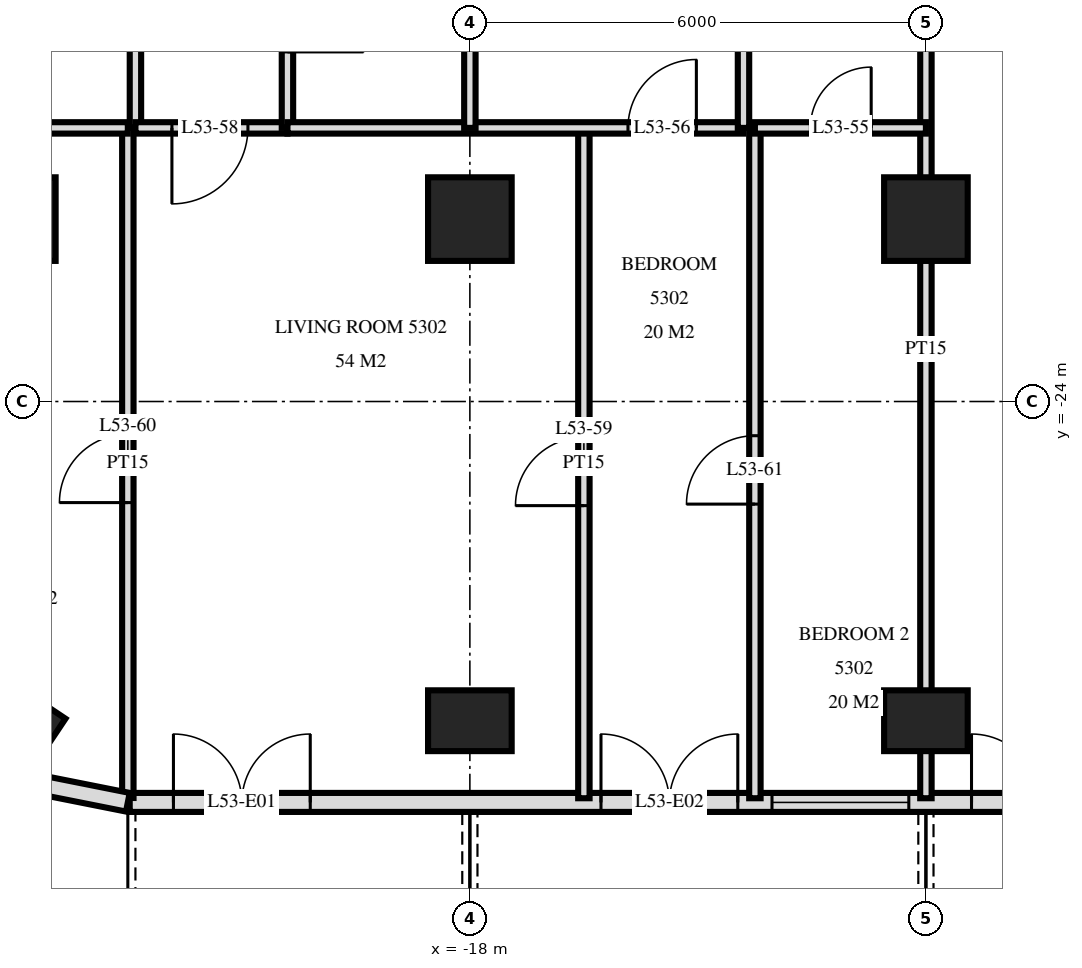
"""IFC4 building model, lengths in metres.
Left out: names, types, materials, properties, quantities, classifications, styles, units other than length and angle.
Written with IfcOpenShell. Run it as: python <this file> out.ifc"""

import sys

from ifc_helpers import new_model, si_unit, direction, frame, frame_2d, origin, origin_2d, place, context, subcontext, project, spatial, rectangle, extrude, element, fill, save


model = new_model("IFC4")
c1 = context("Model", 3, precision=1e-05, world=origin(), true_north=direction((0.0, 1.0)))
c2 = subcontext(c1, "Body", "Model", "MODEL_VIEW")
j1 = project(units=[si_unit("LENGTHUNIT", "METRE"), si_unit("PLANEANGLEUNIT", "RADIAN")], contexts=[c1])
p1 = place(None, origin())
s1 = spatial("IfcSite", under=j1, at=p1, CompositionType="ELEMENT")
p2 = place(p1, origin())
s2 = spatial("IfcBuilding", under=s1, at=p2, CompositionType="ELEMENT")
p3 = place(p2, frame((0.0, 0.0, 204.6)))
s3 = spatial("IfcBuildingStorey", under=s2, at=p3, CompositionType="ELEMENT", Elevation=204.6)
p4 = place(p3, frame((-24.0, -28.2, 0.0), z_axis=(0.0, 0.0, 1.0), x_axis=(-0.831459915646, 0.555584744817, 0.0)))
e1 = element("IfcColumn", 1, at=p4, inside=s3, PredefinedType="COLUMN", context=c2, shape_type="SweptSolid", body=[
    extrude(rectangle(XDim=1.1, YDim=0.8, at=origin_2d()), origin(), (0.0, 0.0, 1.0), 3.5),
])
p5 = place(p3, frame((-24.0, -21.6, 0.0), z_axis=(0.0, 0.0, 1.0), x_axis=(1.0, 0.0, 0.0)))
e2 = element("IfcColumn", 2, at=p5, inside=s3, PredefinedType="COLUMN", context=c2, shape_type="SweptSolid", body=[
    extrude(rectangle(XDim=1.1, YDim=1.1, at=origin_2d()), origin(), (0.0, 0.0, 1.0), 3.5),
])
p6 = place(p3, frame((-18.0, -28.2, 0.0), z_axis=(0.0, 0.0, 1.0), x_axis=(1.0, 0.0, 0.0)))
e3 = element("IfcColumn", 3, at=p6, inside=s3, PredefinedType="COLUMN", context=c2, shape_type="SweptSolid", body=[
    extrude(rectangle(XDim=1.1, YDim=0.8, at=origin_2d()), origin(), (0.0, 0.0, 1.0), 3.5),
])
p7 = place(p3, frame((-18.0, -21.6, 0.0), z_axis=(0.0, 0.0, 1.0), x_axis=(1.0, 0.0, 0.0)))
e4 = element("IfcColumn", 4, at=p7, inside=s3, PredefinedType="COLUMN", context=c2, shape_type="SweptSolid", body=[
    extrude(rectangle(XDim=1.1, YDim=1.1, at=origin_2d()), origin(), (0.0, 0.0, 1.0), 3.5),
])
p8 = place(p3, frame((-12.0, -28.2, 0.0), z_axis=(0.0, 0.0, 1.0), x_axis=(1.0, 0.0, 0.0)))
e5 = element("IfcColumn", 5, at=p8, inside=s3, PredefinedType="COLUMN", context=c2, shape_type="SweptSolid", body=[
    extrude(rectangle(XDim=1.1, YDim=0.8, at=origin_2d()), origin(), (0.0, 0.0, 1.0), 3.5),
])
p9 = place(p3, frame((-12.0, -21.6, 0.0), z_axis=(0.0, 0.0, 1.0), x_axis=(1.0, 0.0, 0.0)))
e6 = element("IfcColumn", 6, at=p9, inside=s3, PredefinedType="COLUMN", context=c2, shape_type="SweptSolid", body=[
    extrude(rectangle(XDim=1.1, YDim=1.1, at=origin_2d()), origin(), (0.0, 0.0, 1.0), 3.5),
])
p10 = place(p3, frame((-24.149, -28.945, 0.0), z_axis=(0.0, 0.0, 1.0), x_axis=(0.980775640221, -0.19513878023, 0.0)))
e7 = element("IfcWall", 7, at=p10, inside=s3, PredefinedType="SOLIDWALL", context=c2, shape_type="SweptSolid", body=[
    extrude(rectangle(XDim=1.681, YDim=0.25, at=frame_2d((0.841, 0.0))), origin(), (0.0, 0.0, 1.0), 3.22),
])
p11 = place(p3, frame((-22.475, -29.275, 0.0), z_axis=(0.0, 0.0, 1.0), x_axis=(1.0, 0.0, 0.0)))
e8 = element("IfcWall", 8, at=p11, inside=s3, PredefinedType="SOLIDWALL", context=c2, shape_type="SweptSolid", body=[
    extrude(rectangle(XDim=44.951, YDim=0.25, at=frame_2d((22.475, 0.0))), origin(), (0.0, 0.0, 1.0), 3.22),
])
p12 = place(p11, frame((0.575, 0.0, 0.0)))
e9 = element("IfcOpeningElement", 9, at=p12, cuts=e8, PredefinedType="OPENING", context=c2, shape_type="SweptSolid", body=[
    extrude(rectangle(XDim=1.8, YDim=2.4, at=frame_2d((0.9, 1.2))), frame((0.0, 0.135, 0.0), z_axis=(0.0, -1.0, 0.0), x_axis=(1.0, 0.0, 0.0)), (0.0, 0.0, 1.0), 0.27),
])
p13 = place(p11, frame((6.2, 0.0, 0.0)))
e10 = element("IfcOpeningElement", 10, at=p13, cuts=e8, PredefinedType="OPENING", context=c2, shape_type="SweptSolid", body=[
    extrude(rectangle(XDim=1.8, YDim=2.4, at=frame_2d((0.9, 1.2))), frame((0.0, 0.135, 0.0), z_axis=(0.0, -1.0, 0.0), x_axis=(1.0, 0.0, 0.0)), (0.0, 0.0, 1.0), 0.27),
])
p14 = place(p11, frame((8.45, 0.0, 0.9)))
e11 = element("IfcOpeningElement", 11, at=p14, cuts=e8, PredefinedType="OPENING", context=c2, shape_type="SweptSolid", body=[
    extrude(rectangle(XDim=1.8, YDim=1.5, at=frame_2d((0.9, 0.75))), frame((0.0, 0.135, 0.0), z_axis=(0.0, -1.0, 0.0), x_axis=(1.0, 0.0, 0.0)), (0.0, 0.0, 1.0), 0.27),
])
p15 = place(p11, frame((11.075, 0.0, 0.0)))
e12 = element("IfcOpeningElement", 12, at=p15, cuts=e8, PredefinedType="OPENING", context=c2, shape_type="SweptSolid", body=[
    extrude(rectangle(XDim=1.8, YDim=2.4, at=frame_2d((0.9, 1.2))), frame((0.0, 0.135, 0.0), z_axis=(0.0, -1.0, 0.0), x_axis=(1.0, 0.0, 0.0)), (0.0, 0.0, 1.0), 0.27),
])
p16 = place(p11, frame((13.775, 0.0, 0.9)))
e13 = element("IfcOpeningElement", 13, at=p16, cuts=e8, PredefinedType="OPENING", context=c2, shape_type="SweptSolid", body=[
    extrude(rectangle(XDim=2.4, YDim=1.5, at=frame_2d((1.2, 0.75))), frame((0.0, 0.135, 0.0), z_axis=(0.0, -1.0, 0.0), x_axis=(1.0, 0.0, 0.0)), (0.0, 0.0, 1.0), 0.27),
])
p17 = place(p11, frame((16.775, 0.0, 0.9)))
e14 = element("IfcOpeningElement", 14, at=p17, cuts=e8, PredefinedType="OPENING", context=c2, shape_type="SweptSolid", body=[
    extrude(rectangle(XDim=2.4, YDim=1.5, at=frame_2d((1.2, 0.75))), frame((0.0, 0.135, 0.0), z_axis=(0.0, -1.0, 0.0), x_axis=(1.0, 0.0, 0.0)), (0.0, 0.0, 1.0), 0.27),
])
p18 = place(p11, frame((20.075, 0.0, 0.0)))
e15 = element("IfcOpeningElement", 15, at=p18, cuts=e8, PredefinedType="OPENING", context=c2, shape_type="SweptSolid", body=[
    extrude(rectangle(XDim=1.8, YDim=2.4, at=frame_2d((0.9, 1.2))), frame((0.0, 0.135, 0.0), z_axis=(0.0, -1.0, 0.0), x_axis=(1.0, 0.0, 0.0)), (0.0, 0.0, 1.0), 0.27),
])
p19 = place(p11, frame((23.075, 0.0, 0.0)))
e16 = element("IfcOpeningElement", 16, at=p19, cuts=e8, PredefinedType="OPENING", context=c2, shape_type="SweptSolid", body=[
    extrude(rectangle(XDim=1.8, YDim=2.4, at=frame_2d((0.9, 1.2))), frame((0.0, 0.135, 0.0), z_axis=(0.0, -1.0, 0.0), x_axis=(1.0, 0.0, 0.0)), (0.0, 0.0, 1.0), 0.27),
])
p20 = place(p11, frame((25.775, 0.0, 0.9)))
e17 = element("IfcOpeningElement", 17, at=p20, cuts=e8, PredefinedType="OPENING", context=c2, shape_type="SweptSolid", body=[
    extrude(rectangle(XDim=2.4, YDim=1.5, at=frame_2d((1.2, 0.75))), frame((0.0, 0.135, 0.0), z_axis=(0.0, -1.0, 0.0), x_axis=(1.0, 0.0, 0.0)), (0.0, 0.0, 1.0), 0.27),
])
p21 = place(p11, frame((29.075, 0.0, 0.0)))
e18 = element("IfcOpeningElement", 18, at=p21, cuts=e8, PredefinedType="OPENING", context=c2, shape_type="SweptSolid", body=[
    extrude(rectangle(XDim=1.8, YDim=2.4, at=frame_2d((0.9, 1.2))), frame((0.0, 0.135, 0.0), z_axis=(0.0, -1.0, 0.0), x_axis=(1.0, 0.0, 0.0)), (0.0, 0.0, 1.0), 0.27),
])
p22 = place(p11, frame((31.775, 0.0, 0.9)))
e19 = element("IfcOpeningElement", 19, at=p22, cuts=e8, PredefinedType="OPENING", context=c2, shape_type="SweptSolid", body=[
    extrude(rectangle(XDim=2.4, YDim=1.5, at=frame_2d((1.2, 0.75))), frame((0.0, 0.135, 0.0), z_axis=(0.0, -1.0, 0.0), x_axis=(1.0, 0.0, 0.0)), (0.0, 0.0, 1.0), 0.27),
])
p23 = place(p11, frame((34.775, 0.0, 0.9)))
e20 = element("IfcOpeningElement", 20, at=p23, cuts=e8, PredefinedType="OPENING", context=c2, shape_type="SweptSolid", body=[
    extrude(rectangle(XDim=2.4, YDim=1.5, at=frame_2d((1.2, 0.75))), frame((0.0, 0.135, 0.0), z_axis=(0.0, -1.0, 0.0), x_axis=(1.0, 0.0, 0.0)), (0.0, 0.0, 1.0), 0.27),
])
p24 = place(p11, frame((38.075, 0.0, 0.0)))
e21 = element("IfcOpeningElement", 21, at=p24, cuts=e8, PredefinedType="OPENING", context=c2, shape_type="SweptSolid", body=[
    extrude(rectangle(XDim=1.8, YDim=2.4, at=frame_2d((0.9, 1.2))), frame((0.0, 0.135, 0.0), z_axis=(0.0, -1.0, 0.0), x_axis=(1.0, 0.0, 0.0)), (0.0, 0.0, 1.0), 0.27),
])
p25 = place(p11, frame((41.075, 0.0, 0.0)))
e22 = element("IfcOpeningElement", 22, at=p25, cuts=e8, PredefinedType="OPENING", context=c2, shape_type="SweptSolid", body=[
    extrude(rectangle(XDim=1.8, YDim=2.4, at=frame_2d((0.9, 1.2))), frame((0.0, 0.135, 0.0), z_axis=(0.0, -1.0, 0.0), x_axis=(1.0, 0.0, 0.0)), (0.0, 0.0, 1.0), 0.27),
])
p26 = place(p3, frame((-12.0, -29.22, 0.0), z_axis=(0.0, 0.0, 1.0), x_axis=(0.0, 1.0, 0.0)))
e23 = element("IfcWall", 23, at=p26, inside=s3, PredefinedType="PARTITIONING", context=c2, shape_type="SweptSolid", body=[
    extrude(rectangle(XDim=11.82, YDim=0.15, at=frame_2d((5.91, 0.0))), origin(), (0.0, 0.0, 1.0), 3.22),
])
p27 = place(p3, frame((-14.25, -29.22, 0.0), z_axis=(0.0, 0.0, 1.0), x_axis=(0.0, 1.0, 0.0)))
e24 = element("IfcWall", 24, at=p27, inside=s3, PredefinedType="PARTITIONING", context=c2, shape_type="SweptSolid", body=[
    extrude(rectangle(XDim=8.82, YDim=0.15, at=frame_2d((4.41, 0.0))), origin(), (0.0, 0.0, 1.0), 3.22),
])
p28 = place(p27, frame((3.87, 0.0, 0.0)))
e25 = element("IfcOpeningElement", 25, at=p28, cuts=e24, PredefinedType="OPENING", context=c2, shape_type="SweptSolid", body=[
    extrude(rectangle(XDim=0.9, YDim=2.1, at=frame_2d((0.45, 1.05))), frame((0.0, 0.085, 0.0), z_axis=(0.0, -1.0, 0.0), x_axis=(1.0, 0.0, 0.0)), (0.0, 0.0, 1.0), 0.17),
])
p29 = place(p3, frame((-14.4, -20.4, 0.0), z_axis=(0.0, 0.0, 1.0), x_axis=(0.0, 1.0, 0.0)))
e26 = element("IfcWall", 26, at=p29, inside=s3, PredefinedType="PARTITIONING", context=c2, shape_type="SweptSolid", body=[
    extrude(rectangle(XDim=3.0, YDim=0.15, at=frame_2d((1.5, 0.0))), origin(), (0.0, 0.0, 1.0), 3.22),
])
p30 = place(p3, frame((-16.5, -29.22, 0.0), z_axis=(0.0, 0.0, 1.0), x_axis=(0.0, 1.0, 0.0)))
e27 = element("IfcWall", 27, at=p30, inside=s3, PredefinedType="PARTITIONING", context=c2, shape_type="SweptSolid", body=[
    extrude(rectangle(XDim=8.82, YDim=0.15, at=frame_2d((4.41, 0.0))), origin(), (0.0, 0.0, 1.0), 3.22),
])
p31 = place(p30, frame((3.85, 0.0, 0.0)))
e28 = element("IfcOpeningElement", 28, at=p31, cuts=e27, PredefinedType="OPENING", context=c2, shape_type="SweptSolid", body=[
    extrude(rectangle(XDim=0.9, YDim=2.1, at=frame_2d((0.45, 1.05))), frame((0.0, 0.085, 0.0), z_axis=(0.0, -1.0, 0.0), x_axis=(1.0, 0.0, 0.0)), (0.0, 0.0, 1.0), 0.17),
])
p32 = place(p3, frame((-18.0, -20.4, 0.0), z_axis=(0.0, 0.0, 1.0), x_axis=(0.0, 1.0, 0.0)))
e29 = element("IfcWall", 29, at=p32, inside=s3, PredefinedType="PARTITIONING", context=c2, shape_type="SweptSolid", body=[
    extrude(rectangle(XDim=3.0, YDim=0.15, at=frame_2d((1.5, 0.0))), origin(), (0.0, 0.0, 1.0), 3.22),
])
p33 = place(p3, frame((-20.4, -20.4, 0.0), z_axis=(0.0, 0.0, 1.0), x_axis=(0.0, 1.0, 0.0)))
e30 = element("IfcWall", 30, at=p33, inside=s3, PredefinedType="PARTITIONING", context=c2, shape_type="SweptSolid", body=[
    extrude(rectangle(XDim=3.0, YDim=0.15, at=frame_2d((1.5, 0.0))), origin(), (0.0, 0.0, 1.0), 3.22),
])
p34 = place(p33, frame((1.0, 0.0, 0.0)))
e31 = element("IfcOpeningElement", 31, at=p34, cuts=e30, PredefinedType="OPENING", context=c2, shape_type="SweptSolid", body=[
    extrude(rectangle(XDim=1.0, YDim=2.1, at=frame_2d((0.5, 1.05))), frame((0.0, 0.085, 0.0), z_axis=(0.0, -1.0, 0.0), x_axis=(1.0, 0.0, 0.0)), (0.0, 0.0, 1.0), 0.17),
])
p35 = place(p3, frame((-22.4, -20.4, 0.0), z_axis=(0.0, 0.0, 1.0), x_axis=(0.0, 1.0, 0.0)))
e32 = element("IfcWall", 32, at=p35, inside=s3, PredefinedType="PARTITIONING", context=c2, shape_type="SweptSolid", body=[
    extrude(rectangle(XDim=3.0, YDim=0.15, at=frame_2d((1.5, 0.0))), origin(), (0.0, 0.0, 1.0), 3.22),
])
p36 = place(p3, frame((-22.5, -29.217, 0.0), z_axis=(0.0, 0.0, 1.0), x_axis=(0.0, 1.0, 0.0)))
e33 = element("IfcWall", 33, at=p36, inside=s3, PredefinedType="PARTITIONING", context=c2, shape_type="SweptSolid", body=[
    extrude(rectangle(XDim=8.817, YDim=0.15, at=frame_2d((4.408, 0.0))), origin(), (0.0, 0.0, 1.0), 3.22),
])
p37 = place(p36, frame((3.886, 0.0, 0.0)))
e34 = element("IfcOpeningElement", 34, at=p37, cuts=e33, PredefinedType="OPENING", context=c2, shape_type="SweptSolid", body=[
    extrude(rectangle(XDim=0.9, YDim=2.1, at=frame_2d((0.45, 1.05))), frame((0.0, 0.085, 0.0), z_axis=(0.0, -1.0, 0.0), x_axis=(1.0, 0.0, 0.0)), (0.0, 0.0, 1.0), 0.17),
])
p38 = place(p3, frame((-22.4, -20.4, 0.0), z_axis=(0.0, 0.0, 1.0), x_axis=(1.0, 0.0, 0.0)))
e35 = element("IfcWall", 35, at=p38, inside=s3, PredefinedType="PARTITIONING", context=c2, shape_type="SweptSolid", body=[
    extrude(rectangle(XDim=2.0, YDim=0.15, at=frame_2d((1.0, 0.0))), origin(), (0.0, 0.0, 1.0), 3.22),
])
p39 = place(p38, frame((0.48, 0.0, 0.0)))
e36 = element("IfcOpeningElement", 36, at=p39, cuts=e35, PredefinedType="OPENING", context=c2, shape_type="SweptSolid", body=[
    extrude(rectangle(XDim=1.0, YDim=2.1, at=frame_2d((0.5, 1.05))), frame((0.0, 0.085, 0.0), z_axis=(0.0, -1.0, 0.0), x_axis=(1.0, 0.0, 0.0)), (0.0, 0.0, 1.0), 0.17),
])
p40 = place(p3, frame((-26.82, -20.4, 0.0), z_axis=(0.0, 0.0, 1.0), x_axis=(1.0, 0.0, 0.0)))
e37 = element("IfcWall", 37, at=p40, inside=s3, PredefinedType="PARTITIONING", context=c2, shape_type="SweptSolid", body=[
    extrude(rectangle(XDim=4.32, YDim=0.15, at=frame_2d((2.16, 0.0))), origin(), (0.0, 0.0, 1.0), 3.22),
])
p41 = place(p3, frame((-20.4, -20.4, 0.0), z_axis=(0.0, 0.0, 1.0), x_axis=(1.0, 0.0, 0.0)))
e38 = element("IfcWall", 38, at=p41, inside=s3, PredefinedType="PARTITIONING", context=c2, shape_type="SweptSolid", body=[
    extrude(rectangle(XDim=6.0, YDim=0.15, at=frame_2d((3.0, 0.0))), origin(), (0.0, 0.0, 1.0), 3.22),
])
p42 = place(p41, frame((4.48, 0.0, 0.0)))
e39 = element("IfcOpeningElement", 39, at=p42, cuts=e38, PredefinedType="OPENING", context=c2, shape_type="SweptSolid", body=[
    extrude(rectangle(XDim=0.9, YDim=2.1, at=frame_2d((0.45, 1.05))), frame((0.0, 0.085, 0.0), z_axis=(0.0, -1.0, 0.0), x_axis=(1.0, 0.0, 0.0)), (0.0, 0.0, 1.0), 0.17),
])
p43 = place(p3, frame((-14.25, -20.4, 0.0), z_axis=(0.0, 0.0, 1.0), x_axis=(1.0, 0.0, 0.0)))
e40 = element("IfcWall", 40, at=p43, inside=s3, PredefinedType="PARTITIONING", context=c2, shape_type="SweptSolid", body=[
    extrude(rectangle(XDim=2.25, YDim=0.15, at=frame_2d((1.125, 0.0))), origin(), (0.0, 0.0, 1.0), 3.22),
])
p44 = place(p43, frame((0.73, 0.0, 0.0)))
e41 = element("IfcOpeningElement", 41, at=p44, cuts=e40, PredefinedType="OPENING", context=c2, shape_type="SweptSolid", body=[
    extrude(rectangle(XDim=0.8, YDim=2.1, at=frame_2d((0.4, 1.05))), frame((0.0, 0.085, 0.0), z_axis=(0.0, -1.0, 0.0), x_axis=(1.0, 0.0, 0.0)), (0.0, 0.0, 1.0), 0.17),
])
p45 = place(p12, origin())
e42 = element("IfcDoor", 42, at=p45, inside=s3, OperationType="DOUBLE_DOOR_SINGLE_SWING", PredefinedType="DOOR", context=c2, shape_type="SweptSolid", body=[
    extrude(rectangle(XDim=1.8, YDim=2.4, at=frame_2d((0.9, 1.2))), frame((0.0, 0.025, 0.0), z_axis=(0.0, -1.0, 0.0), x_axis=(1.0, 0.0, 0.0)), (0.0, 0.0, 1.0), 0.05),
])
fill(e9, e42)
p46 = place(p13, origin())
e43 = element("IfcDoor", 43, at=p46, inside=s3, OperationType="DOUBLE_DOOR_SINGLE_SWING", PredefinedType="DOOR", context=c2, shape_type="SweptSolid", body=[
    extrude(rectangle(XDim=1.8, YDim=2.4, at=frame_2d((0.9, 1.2))), frame((0.0, 0.025, 0.0), z_axis=(0.0, -1.0, 0.0), x_axis=(1.0, 0.0, 0.0)), (0.0, 0.0, 1.0), 0.05),
])
fill(e10, e43)
p47 = place(p14, origin())
e44 = element("IfcWindow", 44, at=p47, inside=s3, PartitioningType="SINGLE_PANEL", PredefinedType="WINDOW", context=c2, shape_type="SweptSolid", body=[
    extrude(rectangle(XDim=1.8, YDim=1.5, at=frame_2d((0.9, 0.75))), frame((0.0, 0.03, 0.0), z_axis=(0.0, -1.0, 0.0), x_axis=(1.0, 0.0, 0.0)), (0.0, 0.0, 1.0), 0.06),
])
fill(e11, e44)
p48 = place(p15, origin())
e45 = element("IfcDoor", 45, at=p48, inside=s3, OperationType="DOUBLE_DOOR_SINGLE_SWING", PredefinedType="DOOR", context=c2, shape_type="SweptSolid", body=[
    extrude(rectangle(XDim=1.8, YDim=2.4, at=frame_2d((0.9, 1.2))), frame((0.0, 0.025, 0.0), z_axis=(0.0, -1.0, 0.0), x_axis=(1.0, 0.0, 0.0)), (0.0, 0.0, 1.0), 0.05),
])
fill(e12, e45)
p49 = place(p44, origin())
e46 = element("IfcDoor", 46, at=p49, inside=s3, OperationType="SINGLE_SWING_LEFT", PredefinedType="DOOR", context=c2, shape_type="SweptSolid", body=[
    extrude(rectangle(XDim=0.8, YDim=2.1, at=frame_2d((0.4, 1.05))), frame((0.0, 0.025, 0.0), z_axis=(0.0, -1.0, 0.0), x_axis=(1.0, 0.0, 0.0)), (0.0, 0.0, 1.0), 0.05),
])
fill(e41, e46)
p50 = place(p42, origin())
e47 = element("IfcDoor", 47, at=p50, inside=s3, OperationType="SINGLE_SWING_LEFT", PredefinedType="DOOR", context=c2, shape_type="SweptSolid", body=[
    extrude(rectangle(XDim=0.9, YDim=2.1, at=frame_2d((0.45, 1.05))), frame((0.0, 0.025, 0.0), z_axis=(0.0, -1.0, 0.0), x_axis=(1.0, 0.0, 0.0)), (0.0, 0.0, 1.0), 0.05),
])
fill(e39, e47)
p51 = place(p39, frame((0.5, 0.0, 0.0), z_axis=(0.0, 0.0, 1.0), x_axis=(-1.0, 0.0, 0.0)))
e48 = element("IfcDoor", 48, at=p51, inside=s3, OperationType="SINGLE_SWING_LEFT", PredefinedType="DOOR", context=c2, shape_type="SweptSolid", body=[
    extrude(rectangle(XDim=1.0, YDim=2.1, at=frame_2d((0.0, 1.05))), frame((0.0, -0.025, 0.0), z_axis=(0.0, 1.0, 0.0), x_axis=(-1.0, 0.0, 0.0)), (0.0, 0.0, 1.0), 0.05),
])
fill(e36, e48)
p52 = place(p31, origin())
e49 = element("IfcDoor", 49, at=p52, inside=s3, OperationType="SINGLE_SWING_RIGHT", PredefinedType="DOOR", context=c2, shape_type="SweptSolid", body=[
    extrude(rectangle(XDim=0.9, YDim=2.1, at=frame_2d((0.45, 1.05))), frame((0.0, 0.025, 0.0), z_axis=(0.0, -1.0, 0.0), x_axis=(1.0, 0.0, 0.0)), (0.0, 0.0, 1.0), 0.05),
])
fill(e28, e49)
p53 = place(p37, origin())
e50 = element("IfcDoor", 50, at=p53, inside=s3, OperationType="SINGLE_SWING_RIGHT", PredefinedType="DOOR", context=c2, shape_type="SweptSolid", body=[
    extrude(rectangle(XDim=0.9, YDim=2.1, at=frame_2d((0.45, 1.05))), frame((0.0, 0.025, 0.0), z_axis=(0.0, -1.0, 0.0), x_axis=(1.0, 0.0, 0.0)), (0.0, 0.0, 1.0), 0.05),
])
fill(e34, e50)
p54 = place(p28, origin())
e51 = element("IfcDoor", 51, at=p54, inside=s3, OperationType="SINGLE_SWING_RIGHT", PredefinedType="DOOR", context=c2, shape_type="SweptSolid", body=[
    extrude(rectangle(XDim=0.9, YDim=2.1, at=frame_2d((0.45, 1.05))), frame((0.0, 0.025, 0.0), z_axis=(0.0, -1.0, 0.0), x_axis=(1.0, 0.0, 0.0)), (0.0, 0.0, 1.0), 0.05),
])
fill(e25, e51)
save(model, sys.argv[1])
